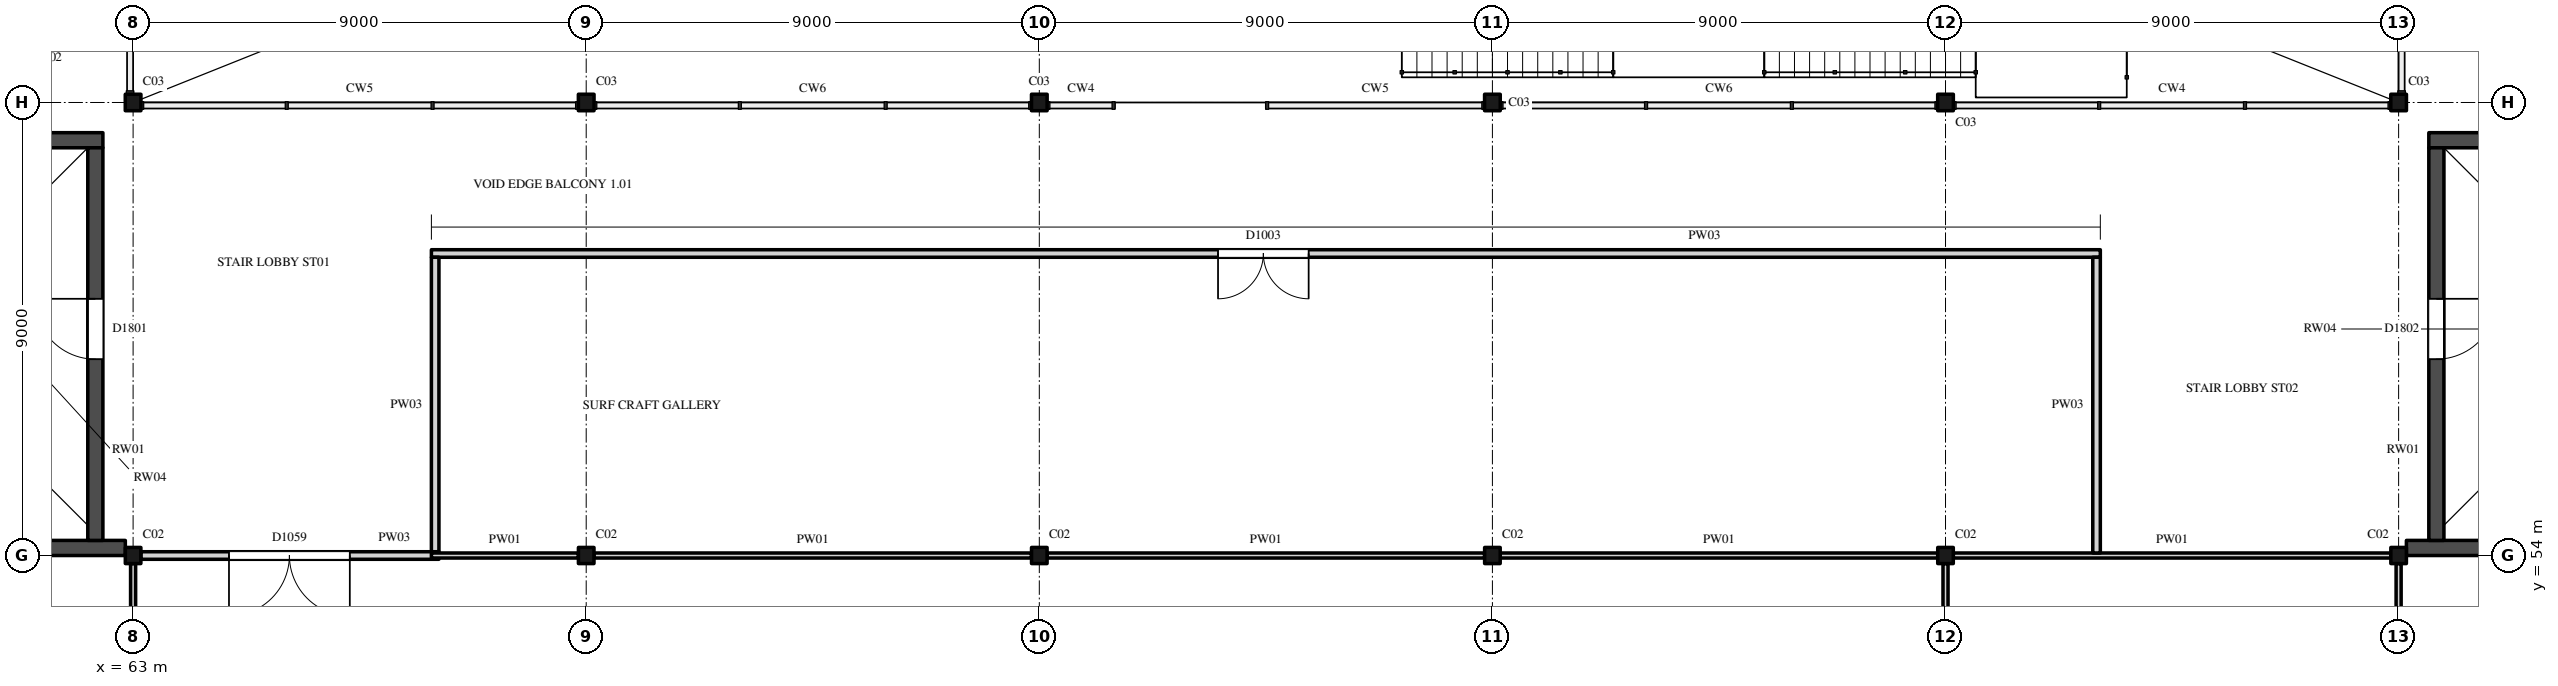
"""IFC4 building model, lengths in metres.
Left out: names, types, materials, properties, quantities, classifications, styles, units other than length and angle.
Written with IfcOpenShell. Run it as: python <this file> out.ifc"""

import sys

from ifc_helpers import new_model, si_unit, direction, frame, frame_2d, origin, origin_2d, place, context, subcontext, project, spatial, rectangle, i_section, extrude, element, fill, save


model = new_model("IFC4")
c1 = context("Model", 3, precision=1e-05, world=origin(), true_north=direction((0.0, 1.0)))
c2 = subcontext(c1, "Body", "Model", "MODEL_VIEW")
j1 = project(units=[si_unit("LENGTHUNIT", "METRE"), si_unit("PLANEANGLEUNIT", "RADIAN")], contexts=[c1])
p1 = place(None, origin())
s1 = spatial("IfcSite", under=j1, at=p1, CompositionType="ELEMENT")
p2 = place(p1, origin())
s2 = spatial("IfcBuilding", under=s1, at=p2, CompositionType="ELEMENT")
p3 = place(p2, frame((0.0, 0.0, 6.0)))
s3 = spatial("IfcBuildingStorey", under=s2, at=p3, CompositionType="ELEMENT", Elevation=6.0)
for number, where, z_axis, x_axis in (
    (1, (63.0, 54.0, 0.0), (0.0, 0.0, 1.0), (1.0, 0.0, 0.0)),
    (2, (72.0, 54.0, 0.0), (0.0, 0.0, 1.0), (1.0, 0.0, 0.0)),
    (3, (81.0, 54.0, 0.0), (0.0, 0.0, 1.0), (1.0, 0.0, 0.0)),
    (4, (90.0, 54.0, 0.0), (0.0, 0.0, 1.0), (1.0, 0.0, 0.0)),
    (5, (99.0, 54.0, 0.0), (0.0, 0.0, 1.0), (1.0, 0.0, 0.0)),
    (6, (108.0, 54.0, 0.0), (0.0, 0.0, 1.0), (1.0, 0.0, 0.0)),
):
    element("IfcColumn", number, at=place(p3, frame(where, z_axis=z_axis, x_axis=x_axis)), inside=s3, PredefinedType="COLUMN", context=c2, shape_type="SweptSolid", body=[
        extrude(i_section(OverallWidth=0.309, OverallDepth=0.321, WebThickness=0.014, FlangeThickness=0.022, FilletRadius=0.017, at=origin_2d()), origin(), (0.0, 0.0, 1.0), 5.0),
    ])
for number, where, z_axis, x_axis in (
    (7, (63.0, 63.0, 0.0), (0.0, 0.0, 1.0), (1.0, 0.0, 0.0)),
    (8, (72.0, 63.0, 0.0), (0.0, 0.0, 1.0), (1.0, 0.0, 0.0)),
    (9, (81.0, 63.0, 0.0), (0.0, 0.0, 1.0), (1.0, 0.0, 0.0)),
    (10, (90.0, 63.0, 0.0), (0.0, 0.0, 1.0), (1.0, 0.0, 0.0)),
    (11, (99.0, 63.0, 0.0), (0.0, 0.0, 1.0), (1.0, 0.0, 0.0)),
    (12, (108.0, 63.0, 0.0), (0.0, 0.0, 1.0), (1.0, 0.0, 0.0)),
):
    element("IfcColumn", number, at=place(p3, frame(where, z_axis=z_axis, x_axis=x_axis)), inside=s3, PredefinedType="COLUMN", context=c2, shape_type="SweptSolid", body=[
        extrude(i_section(OverallWidth=0.311, OverallDepth=0.327, WebThickness=0.016, FlangeThickness=0.025, FilletRadius=0.017, at=origin_2d()), origin(), (0.0, 0.0, 1.0), 5.0),
    ])
p4 = place(p3, frame((54.3, 54.15, 0.0), z_axis=(0.0, 0.0, 1.0), x_axis=(1.0, 0.0, 0.0)))
e13 = element("IfcWall", 13, at=p4, inside=s3, PredefinedType="SHEAR", context=c2, shape_type="SweptSolid", body=[
    extrude(rectangle(XDim=8.545, YDim=0.3, at=frame_2d((4.273, 0.0))), origin(), (0.0, 0.0, 1.0), 5.0),
])
p5 = place(p3, frame((54.3, 62.25, 0.0), z_axis=(0.0, 0.0, 1.0), x_axis=(1.0, 0.0, 0.0)))
e14 = element("IfcWall", 14, at=p5, inside=s3, PredefinedType="SHEAR", context=c2, shape_type="SweptSolid", body=[
    extrude(rectangle(XDim=8.1, YDim=0.3, at=frame_2d((4.05, 0.0))), origin(), (0.0, 0.0, 1.0), 5.0),
])
p6 = place(p3, frame((62.25, 54.3, 0.0), z_axis=(0.0, 0.0, 1.0), x_axis=(0.0, 1.0, 0.0)))
e15 = element("IfcWall", 15, at=p6, inside=s3, PredefinedType="SHEAR", context=c2, shape_type="SweptSolid", body=[
    extrude(rectangle(XDim=7.8, YDim=0.3, at=frame_2d((3.9, 0.0))), origin(), (0.0, 0.0, 1.0), 5.0),
])
p7 = place(p6, frame((3.6, 0.0, 0.0)))
e16 = element("IfcOpeningElement", 16, at=p7, cuts=e15, PredefinedType="OPENING", context=c2, shape_type="SweptSolid", body=[
    extrude(rectangle(XDim=1.2, YDim=2.1, at=frame_2d((0.6, 1.05))), frame((0.0, 0.16, 0.0), z_axis=(0.0, -1.0, 0.0), x_axis=(1.0, 0.0, 0.0)), (0.0, 0.0, 1.0), 0.32),
])
p8 = place(p3, frame((108.155, 54.15, 0.0), z_axis=(0.0, 0.0, 1.0), x_axis=(1.0, 0.0, 0.0)))
e17 = element("IfcWall", 17, at=p8, inside=s3, PredefinedType="SHEAR", context=c2, shape_type="SweptSolid", body=[
    extrude(rectangle(XDim=8.545, YDim=0.3, at=frame_2d((4.273, 0.0))), origin(), (0.0, 0.0, 1.0), 5.0),
])
p9 = place(p3, frame((108.6, 62.25, 0.0), z_axis=(0.0, 0.0, 1.0), x_axis=(1.0, 0.0, 0.0)))
e18 = element("IfcWall", 18, at=p9, inside=s3, PredefinedType="SHEAR", context=c2, shape_type="SweptSolid", body=[
    extrude(rectangle(XDim=8.1, YDim=0.3, at=frame_2d((4.05, 0.0))), origin(), (0.0, 0.0, 1.0), 5.0),
])
p10 = place(p3, frame((108.75, 54.3, 0.0), z_axis=(0.0, 0.0, 1.0), x_axis=(0.0, 1.0, 0.0)))
e19 = element("IfcWall", 19, at=p10, inside=s3, PredefinedType="SHEAR", context=c2, shape_type="SweptSolid", body=[
    extrude(rectangle(XDim=7.8, YDim=0.3, at=frame_2d((3.9, 0.0))), origin(), (0.0, 0.0, 1.0), 5.0),
])
p11 = place(p10, frame((3.6, 0.0, 0.0)))
e20 = element("IfcOpeningElement", 20, at=p11, cuts=e19, PredefinedType="OPENING", context=c2, shape_type="SweptSolid", body=[
    extrude(rectangle(XDim=1.2, YDim=2.1, at=frame_2d((0.6, 1.05))), frame((0.0, 0.16, 0.0), z_axis=(0.0, -1.0, 0.0), x_axis=(1.0, 0.0, 0.0)), (0.0, 0.0, 1.0), 0.32),
])
p12 = place(p2, origin())
s4 = spatial("IfcBuildingStorey", under=s2, at=p12, CompositionType="ELEMENT", Elevation=0.0)
p13 = place(p12, frame((94.85, 63.5, 0.0), z_axis=(0.0, 0.0, 1.0), x_axis=(0.0, 1.0, 0.0)))
e21 = element("IfcWall", 21, at=p13, inside=s4, PredefinedType="SHEAR", context=c2, shape_type="SweptSolid", body=[
    extrude(rectangle(XDim=3.0, YDim=0.3, at=frame_2d((1.5, 0.0))), origin(), (0.0, 0.0, 1.0), 8.3),
])
p14 = place(p12, frame((92.4, 63.9, 0.0), z_axis=(0.0, 0.0, 1.0), x_axis=(1.0, 0.0, 0.0)))
e22 = element("IfcWall", 22, at=p14, inside=s4, PredefinedType="SHEAR", context=c2, shape_type="SweptSolid", body=[
    extrude(rectangle(XDim=2.3, YDim=0.3, at=frame_2d((1.15, 0.0))), origin(), (0.0, 0.0, 1.0), 8.3),
])
p15 = place(p12, frame((100.4, 63.5, 0.0), z_axis=(0.0, 0.0, 1.0), x_axis=(0.0, 1.0, 0.0)))
e23 = element("IfcWall", 23, at=p15, inside=s4, PredefinedType="SHEAR", context=c2, shape_type="SweptSolid", body=[
    extrude(rectangle(XDim=3.0, YDim=0.3, at=frame_2d((1.5, 0.0))), origin(), (0.0, 0.0, 1.0), 10.8),
])
p16 = place(p3, frame((63.155, 54.0, 0.0), z_axis=(0.0, 0.0, 1.0), x_axis=(1.0, 0.0, 0.0)))
e24 = element("IfcWall", 24, at=p16, inside=s3, PredefinedType="PARTITIONING", context=c2, shape_type="SweptSolid", body=[
    extrude(rectangle(XDim=5.92, YDim=0.15, at=frame_2d((2.96, 0.0))), origin(), (0.0, 0.0, 1.0), 4.466),
])
p17 = place(p16, frame((1.75, 0.0, 0.0)))
e25 = element("IfcOpeningElement", 25, at=p17, cuts=e24, PredefinedType="OPENING", context=c2, shape_type="SweptSolid", body=[
    extrude(rectangle(XDim=2.4, YDim=3.0, at=frame_2d((1.2, 1.5))), frame((0.0, 0.085, 0.0), z_axis=(0.0, -1.0, 0.0), x_axis=(1.0, 0.0, 0.0)), (0.0, 0.0, 1.0), 0.17),
])
p18 = place(p3, frame((68.925, 54.0, 0.0), z_axis=(0.0, 0.0, 1.0), x_axis=(1.0, 0.0, 0.0)))
e26 = element("IfcWall", 26, at=p18, inside=s3, PredefinedType="PARTITIONING", context=c2, shape_type="SweptSolid", body=[
    extrude(rectangle(XDim=2.92, YDim=0.1, at=frame_2d((1.46, 0.0))), origin(), (0.0, 0.0, 1.0), 4.466),
])
for number, where, z_axis, x_axis in (
    (27, (72.155, 54.0, 0.0), (0.0, 0.0, 1.0), (1.0, 0.0, 0.0)),
    (28, (81.155, 54.0, 0.0), (0.0, 0.0, 1.0), (1.0, 0.0, 0.0)),
    (29, (90.155, 54.0, 0.0), (0.0, 0.0, 1.0), (1.0, 0.0, 0.0)),
    (30, (99.155, 54.0, 0.0), (0.0, 0.0, 1.0), (1.0, 0.0, 0.0)),
):
    element("IfcWall", number, at=place(p3, frame(where, z_axis=z_axis, x_axis=x_axis)), inside=s3, PredefinedType="PARTITIONING", context=c2, shape_type="SweptSolid", body=[
        extrude(rectangle(XDim=8.691, YDim=0.1, at=frame_2d((4.345, 0.0))), origin(), (0.0, 0.0, 1.0), 4.466),
    ])
p19 = place(p3, frame((68.925, 60.0, 0.0), z_axis=(0.0, 0.0, 1.0), x_axis=(1.0, 0.0, 0.0)))
e31 = element("IfcWall", 31, at=p19, inside=s3, PredefinedType="PARTITIONING", context=c2, shape_type="SweptSolid", body=[
    extrude(rectangle(XDim=33.15, YDim=0.15, at=frame_2d((16.575, 0.0))), origin(), (0.0, 0.0, 1.0), 4.473),
])
p20 = place(p19, frame((15.625, 0.0, 0.0)))
e32 = element("IfcOpeningElement", 32, at=p20, cuts=e31, PredefinedType="OPENING", context=c2, shape_type="SweptSolid", body=[
    extrude(rectangle(XDim=1.8, YDim=2.4, at=frame_2d((0.9, 1.2))), frame((0.0, 0.085, 0.0), z_axis=(0.0, -1.0, 0.0), x_axis=(1.0, 0.0, 0.0)), (0.0, 0.0, 1.0), 0.17),
])
p21 = place(p3, frame((63.0, 45.16, 0.0), z_axis=(0.0, 0.0, 1.0), x_axis=(0.0, 1.0, 0.0)))
e33 = element("IfcWall", 33, at=p21, inside=s3, PredefinedType="PARTITIONING", context=c2, shape_type="SweptSolid", body=[
    extrude(rectangle(XDim=8.679, YDim=0.1, at=frame_2d((4.34, 0.0))), origin(), (0.0, 0.0, 1.0), 4.297),
])
p22 = place(p21, frame((3.65, 0.0, 0.0)))
e34 = element("IfcOpeningElement", 34, at=p22, cuts=e33, PredefinedType="OPENING", context=c2, shape_type="SweptSolid", body=[
    extrude(rectangle(XDim=1.35, YDim=2.4, at=frame_2d((0.675, 1.2))), frame((0.0, 0.06, 0.0), z_axis=(0.0, -1.0, 0.0), x_axis=(1.0, 0.0, 0.0)), (0.0, 0.0, 1.0), 0.12),
])
p23 = place(p3, frame((69.0, 54.075, 0.0), z_axis=(0.0, 0.0, 1.0), x_axis=(0.0, 1.0, 0.0)))
e35 = element("IfcWall", 35, at=p23, inside=s3, PredefinedType="PARTITIONING", context=c2, shape_type="SweptSolid", body=[
    extrude(rectangle(XDim=5.85, YDim=0.15, at=frame_2d((2.925, 0.0))), origin(), (0.0, 0.0, 1.0), 4.825),
])
p24 = place(p3, frame((99.0, 45.16, 0.0), z_axis=(0.0, 0.0, 1.0), x_axis=(0.0, 1.0, 0.0)))
e36 = element("IfcWall", 36, at=p24, inside=s3, PredefinedType="PARTITIONING", context=c2, shape_type="SweptSolid", body=[
    extrude(rectangle(XDim=8.679, YDim=0.1, at=frame_2d((4.34, 0.0))), origin(), (0.0, 0.0, 1.0), 4.297),
])
p25 = place(p3, frame((102.0, 54.05, 0.0), z_axis=(0.0, 0.0, 1.0), x_axis=(0.0, 1.0, 0.0)))
e37 = element("IfcWall", 37, at=p25, inside=s3, PredefinedType="PARTITIONING", context=c2, shape_type="SweptSolid", body=[
    extrude(rectangle(XDim=5.875, YDim=0.15, at=frame_2d((2.938, 0.0))), origin(), (0.0, 0.0, 1.0), 4.825),
])
p26 = place(p3, frame((108.0, 45.16, 0.0), z_axis=(0.0, 0.0, 1.0), x_axis=(0.0, 1.0, 0.0)))
e38 = element("IfcWall", 38, at=p26, inside=s3, PredefinedType="PARTITIONING", context=c2, shape_type="SweptSolid", body=[
    extrude(rectangle(XDim=8.679, YDim=0.1, at=frame_2d((4.34, 0.0))), origin(), (0.0, 0.0, 1.0), 4.297),
])
p27 = place(p26, frame((3.65, 0.0, 0.0)))
e39 = element("IfcOpeningElement", 39, at=p27, cuts=e38, PredefinedType="OPENING", context=c2, shape_type="SweptSolid", body=[
    extrude(rectangle(XDim=1.35, YDim=2.4, at=frame_2d((0.675, 1.2))), frame((0.0, 0.06, 0.0), z_axis=(0.0, -1.0, 0.0), x_axis=(1.0, 0.0, 0.0)), (0.0, 0.0, 1.0), 0.12),
])
p28 = place(p7, origin())
e40 = element("IfcDoor", 40, at=p28, inside=s3, OperationType="SINGLE_SWING_LEFT", PredefinedType="DOOR", context=c2, shape_type="SweptSolid", body=[
    extrude(rectangle(XDim=1.2, YDim=2.1, at=frame_2d((0.6, 1.05))), frame((0.0, 0.025, 0.0), z_axis=(0.0, -1.0, 0.0), x_axis=(1.0, 0.0, 0.0)), (0.0, 0.0, 1.0), 0.05),
])
fill(e16, e40)
p29 = place(p11, origin())
e41 = element("IfcDoor", 41, at=p29, inside=s3, OperationType="SINGLE_SWING_RIGHT", PredefinedType="DOOR", context=c2, shape_type="SweptSolid", body=[
    extrude(rectangle(XDim=1.2, YDim=2.1, at=frame_2d((0.6, 1.05))), frame((0.0, 0.025, 0.0), z_axis=(0.0, -1.0, 0.0), x_axis=(1.0, 0.0, 0.0)), (0.0, 0.0, 1.0), 0.05),
])
fill(e20, e41)
p30 = place(p20, origin())
e42 = element("IfcDoor", 42, at=p30, inside=s3, OperationType="DOUBLE_DOOR_SINGLE_SWING", PredefinedType="DOOR", context=c2, shape_type="SweptSolid", body=[
    extrude(rectangle(XDim=1.8, YDim=2.4, at=frame_2d((0.9, 1.2))), frame((0.0, 0.025, 0.0), z_axis=(0.0, -1.0, 0.0), x_axis=(1.0, 0.0, 0.0)), (0.0, 0.0, 1.0), 0.05),
])
fill(e32, e42)
p31 = place(p17, origin())
e43 = element("IfcDoor", 43, at=p31, inside=s3, OperationType="DOUBLE_DOOR_SINGLE_SWING", PredefinedType="DOOR", context=c2, shape_type="SweptSolid", body=[
    extrude(rectangle(XDim=2.4, YDim=3.0, at=frame_2d((1.2, 1.5))), frame((0.0, 0.025, 0.0), z_axis=(0.0, -1.0, 0.0), x_axis=(1.0, 0.0, 0.0)), (0.0, 0.0, 1.0), 0.05),
])
fill(e25, e43)
save(model, sys.argv[1])
